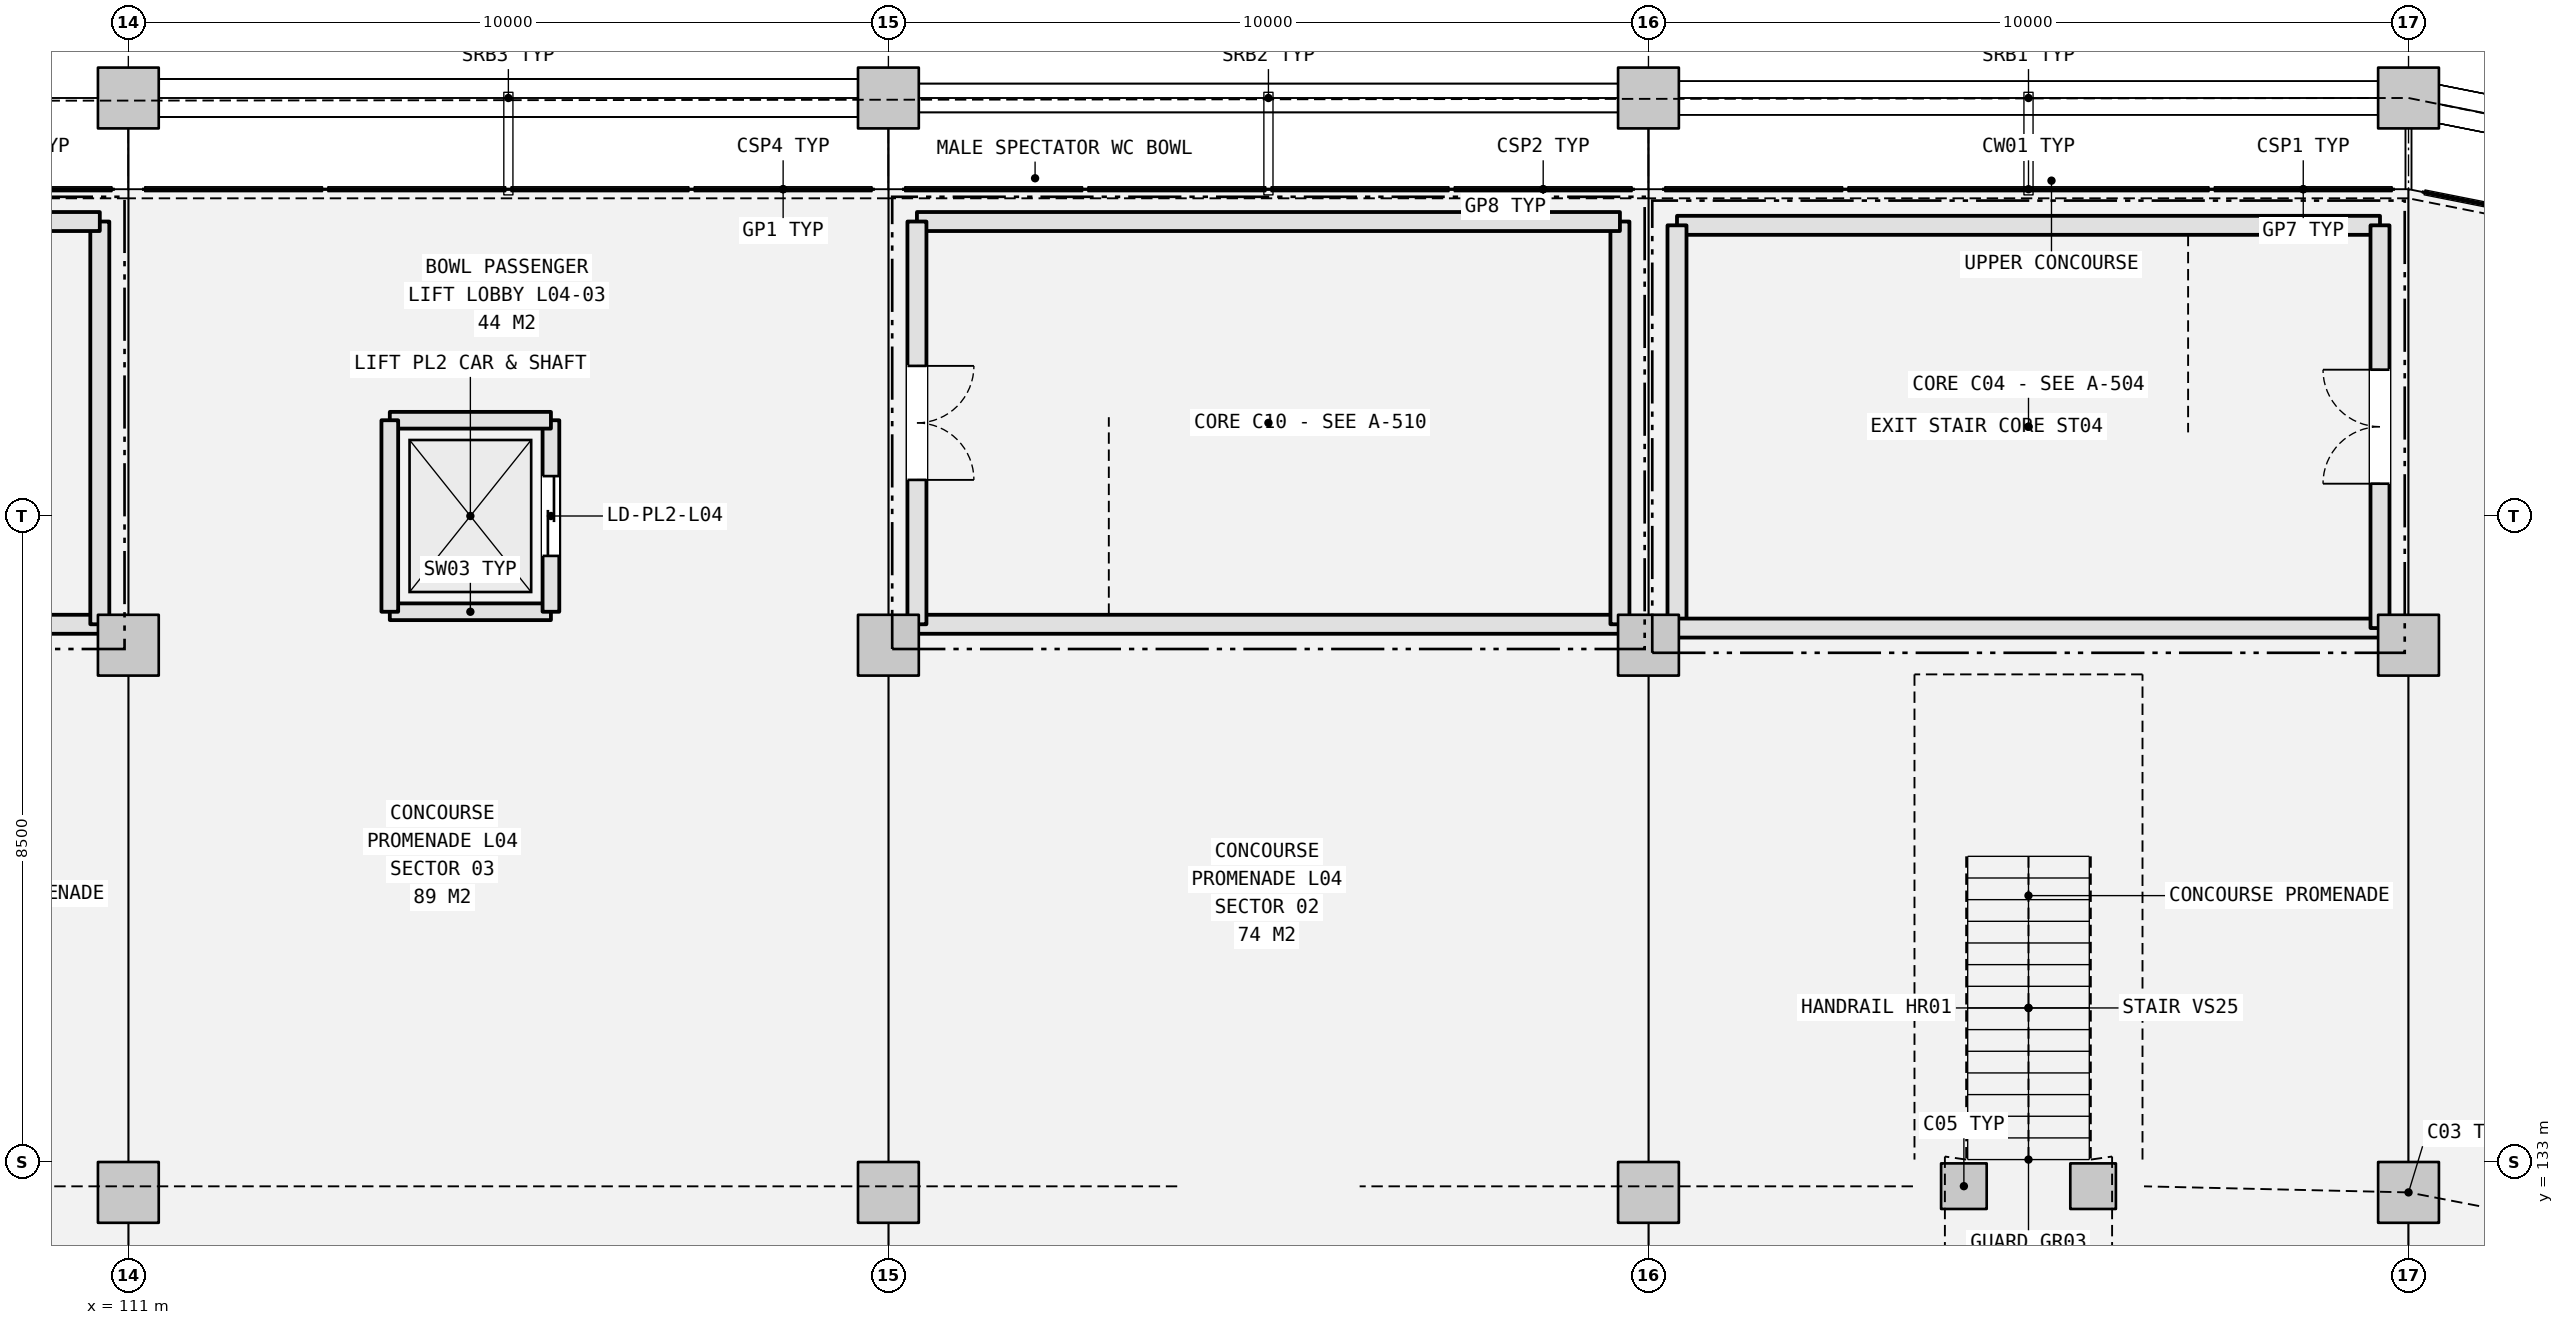
"""IFC4 building model, lengths in metres.
Left out: names, types, materials, properties, quantities, classifications, styles, units other than length and angle.
Written with IfcOpenShell. Run it as: python <this file> out.ifc"""

import sys

from ifc_helpers import new_model, si_unit, direction, frame, frame_2d, origin, origin_2d, place, context, subcontext, project, spatial, rectangle, extrude, element, fill, save


model = new_model("IFC4")
c1 = context("Model", 3, precision=1e-05, world=origin(), true_north=direction((0.0, 1.0)))
c2 = subcontext(c1, "Body", "Model", "MODEL_VIEW")
j1 = project(units=[si_unit("LENGTHUNIT", "METRE"), si_unit("PLANEANGLEUNIT", "RADIAN")], contexts=[c1])
p1 = place(None, origin())
s1 = spatial("IfcSite", under=j1, at=p1, CompositionType="ELEMENT")
p2 = place(p1, origin())
s2 = spatial("IfcBuilding", under=s1, at=p2, CompositionType="ELEMENT")
p3 = place(p2, frame((0.0, 0.0, 21.6)))
s3 = spatial("IfcBuildingStorey", under=s2, at=p3, CompositionType="ELEMENT", Elevation=21.6)
for number, where, z_axis, x_axis in (
    (1, (141.0, 132.6, 0.0), (0.0, 0.0, 1.0), (1.0, 0.0, 0.0)),
    (2, (141.0, 139.8, 0.0), (0.0, 0.0, 1.0), (1.0, 0.0, 0.0)),
    (3, (141.0, 147.0, 0.0), (0.0, 0.0, 1.0), (1.0, 0.0, 0.0)),
    (4, (131.0, 132.6, 0.0), (0.0, 0.0, 1.0), (1.0, 0.0, 0.0)),
    (5, (131.0, 139.8, 0.0), (0.0, 0.0, 1.0), (1.0, 0.0, 0.0)),
    (6, (131.0, 147.0, 0.0), (0.0, 0.0, 1.0), (1.0, 0.0, 0.0)),
    (7, (121.0, 132.6, 0.0), (0.0, 0.0, 1.0), (1.0, 0.0, 0.0)),
    (8, (121.0, 139.8, 0.0), (0.0, 0.0, 1.0), (1.0, 0.0, 0.0)),
    (9, (121.0, 147.0, 0.0), (0.0, 0.0, 1.0), (1.0, 0.0, 0.0)),
    (10, (111.0, 132.6, 0.0), (0.0, 0.0, 1.0), (1.0, 0.0, 0.0)),
    (11, (111.0, 139.8, 0.0), (0.0, 0.0, 1.0), (1.0, 0.0, 0.0)),
    (12, (111.0, 147.0, 0.0), (0.0, 0.0, 1.0), (1.0, 0.0, 0.0)),
):
    element("IfcColumn", number, at=place(p3, frame(where, z_axis=z_axis, x_axis=x_axis)), inside=s3, PredefinedType="COLUMN", context=c2, shape_type="SweptSolid", body=[
        extrude(rectangle(XDim=0.8, YDim=0.8, at=origin_2d()), origin(), (0.0, 0.0, 1.0), 5.4),
    ])
p4 = place(p3, frame((140.625, 145.325, 0.0), z_axis=(0.0, 0.0, 1.0), x_axis=(-1.0, 0.0, 0.0)))
e13 = element("IfcWall", 13, at=p4, inside=s3, PredefinedType="SHEAR", context=c2, shape_type="SweptSolid", body=[
    extrude(rectangle(XDim=9.249, YDim=0.25, at=frame_2d((4.625, 0.0))), origin(), (0.0, 0.0, 1.0), 5.15),
])
p5 = place(p3, frame((131.375, 145.325, 0.0), z_axis=(0.0, 0.0, 1.0), x_axis=(0.0, -1.0, 0.0)))
e14 = element("IfcWall", 14, at=p5, inside=s3, PredefinedType="SHEAR", context=c2, shape_type="SweptSolid", body=[
    extrude(rectangle(XDim=5.299, YDim=0.25, at=frame_2d((2.65, 0.0))), origin(), (0.0, 0.0, 1.0), 5.15),
])
p6 = place(p3, frame((131.375, 140.025, 0.0), z_axis=(0.0, 0.0, 1.0), x_axis=(1.0, 0.0, 0.0)))
e15 = element("IfcWall", 15, at=p6, inside=s3, PredefinedType="SHEAR", context=c2, shape_type="SweptSolid", body=[
    extrude(rectangle(XDim=9.249, YDim=0.25, at=frame_2d((4.625, 0.0))), origin(), (0.0, 0.0, 1.0), 5.15),
])
p7 = place(p3, frame((140.625, 140.025, 0.0), z_axis=(0.0, 0.0, 1.0), x_axis=(0.0, 1.0, 0.0)))
e16 = element("IfcWall", 16, at=p7, inside=s3, PredefinedType="SHEAR", context=c2, shape_type="SweptSolid", body=[
    extrude(rectangle(XDim=5.299, YDim=0.25, at=frame_2d((2.65, 0.0))), origin(), (0.0, 0.0, 1.0), 5.15),
])
p8 = place(p7, frame((1.9, 0.0, 0.0)))
e17 = element("IfcOpeningElement", 17, at=p8, cuts=e16, PredefinedType="OPENING", context=c2, shape_type="SweptSolid", body=[
    extrude(rectangle(XDim=1.5, YDim=2.2, at=frame_2d((0.75, 1.1))), frame((0.0, 0.135, 0.0), z_axis=(0.0, -1.0, 0.0), x_axis=(1.0, 0.0, 0.0)), (0.0, 0.0, 1.0), 0.27),
])
p9 = place(p3, frame((121.375, 140.075, 0.0), z_axis=(0.0, 0.0, 1.0), x_axis=(1.0, 0.0, 0.0)))
e18 = element("IfcWall", 18, at=p9, inside=s3, PredefinedType="SHEAR", context=c2, shape_type="SweptSolid", body=[
    extrude(rectangle(XDim=9.249, YDim=0.25, at=frame_2d((4.625, 0.0))), origin(), (0.0, 0.0, 1.0), 5.15),
])
p10 = place(p3, frame((130.625, 140.075, 0.0), z_axis=(0.0, 0.0, 1.0), x_axis=(0.0, 1.0, 0.0)))
e19 = element("IfcWall", 19, at=p10, inside=s3, PredefinedType="SHEAR", context=c2, shape_type="SweptSolid", body=[
    extrude(rectangle(XDim=5.299, YDim=0.25, at=frame_2d((2.649, 0.0))), origin(), (0.0, 0.0, 1.0), 5.15),
])
p11 = place(p3, frame((130.625, 145.375, 0.0), z_axis=(0.0, 0.0, 1.0), x_axis=(-1.0, 0.0, 0.0)))
e20 = element("IfcWall", 20, at=p11, inside=s3, PredefinedType="SHEAR", context=c2, shape_type="SweptSolid", body=[
    extrude(rectangle(XDim=9.249, YDim=0.25, at=frame_2d((4.625, 0.0))), origin(), (0.0, 0.0, 1.0), 5.15),
])
p12 = place(p3, frame((121.375, 145.375, 0.0), z_axis=(0.0, 0.0, 1.0), x_axis=(0.0, -1.0, 0.0)))
e21 = element("IfcWall", 21, at=p12, inside=s3, PredefinedType="SHEAR", context=c2, shape_type="SweptSolid", body=[
    extrude(rectangle(XDim=5.299, YDim=0.25, at=frame_2d((2.649, 0.0))), origin(), (0.0, 0.0, 1.0), 5.15),
])
p13 = place(p12, frame((1.9, 0.0, 0.0)))
e22 = element("IfcOpeningElement", 22, at=p13, cuts=e21, PredefinedType="OPENING", context=c2, shape_type="SweptSolid", body=[
    extrude(rectangle(XDim=1.5, YDim=2.2, at=frame_2d((0.75, 1.1))), frame((0.0, 0.135, 0.0), z_axis=(0.0, -1.0, 0.0), x_axis=(1.0, 0.0, 0.0)), (0.0, 0.0, 1.0), 0.27),
])
p14 = place(p3, frame((101.375, 140.075, 0.0), z_axis=(0.0, 0.0, 1.0), x_axis=(1.0, 0.0, 0.0)))
e23 = element("IfcWall", 23, at=p14, inside=s3, PredefinedType="SHEAR", context=c2, shape_type="SweptSolid", body=[
    extrude(rectangle(XDim=9.249, YDim=0.25, at=frame_2d((4.625, 0.0))), origin(), (0.0, 0.0, 1.0), 5.15),
])
p15 = place(p3, frame((110.625, 140.075, 0.0), z_axis=(0.0, 0.0, 1.0), x_axis=(0.0, 1.0, 0.0)))
e24 = element("IfcWall", 24, at=p15, inside=s3, PredefinedType="SHEAR", context=c2, shape_type="SweptSolid", body=[
    extrude(rectangle(XDim=5.299, YDim=0.25, at=frame_2d((2.649, 0.0))), origin(), (0.0, 0.0, 1.0), 5.15),
])
p16 = place(p3, frame((110.625, 145.375, 0.0), z_axis=(0.0, 0.0, 1.0), x_axis=(-1.0, 0.0, 0.0)))
e25 = element("IfcWall", 25, at=p16, inside=s3, PredefinedType="SHEAR", context=c2, shape_type="SweptSolid", body=[
    extrude(rectangle(XDim=9.249, YDim=0.25, at=frame_2d((4.625, 0.0))), origin(), (0.0, 0.0, 1.0), 5.15),
])
for number, where, z_axis, x_axis in (
    (26, (135.15, 132.682, 0.0), (0.0, 0.0, 1.0), (1.0, 0.0, 0.0)),
    (27, (136.85, 132.682, 0.0), (0.0, 0.0, 1.0), (1.0, 0.0, 0.0)),
):
    element("IfcColumn", number, at=place(p3, frame(where, z_axis=z_axis, x_axis=x_axis)), inside=s3, PredefinedType="COLUMN", context=c2, shape_type="SweptSolid", body=[
        extrude(rectangle(XDim=0.6, YDim=0.6, at=origin_2d()), origin(), (0.0, 0.0, 1.0), 2.494),
    ])
p17 = place(p3, frame((114.44, 140.24, 0.0), z_axis=(0.0, 0.0, 1.0), x_axis=(1.0, 0.0, 0.0)))
e28 = element("IfcWall", 28, at=p17, inside=s3, PredefinedType="SHEAR", context=c2, shape_type="SweptSolid", body=[
    extrude(rectangle(XDim=2.12, YDim=0.22, at=frame_2d((1.06, 0.0))), origin(), (0.0, 0.0, 1.0), 5.15),
])
p18 = place(p3, frame((116.56, 140.24, 0.0), z_axis=(0.0, 0.0, 1.0), x_axis=(0.0, 1.0, 0.0)))
e29 = element("IfcWall", 29, at=p18, inside=s3, PredefinedType="SHEAR", context=c2, shape_type="SweptSolid", body=[
    extrude(rectangle(XDim=2.52, YDim=0.22, at=frame_2d((1.26, 0.0))), origin(), (0.0, 0.0, 1.0), 5.15),
])
p19 = place(p18, frame((0.735, 0.0, 0.0)))
e30 = element("IfcOpeningElement", 30, at=p19, cuts=e29, PredefinedType="OPENING", context=c2, shape_type="SweptSolid", body=[
    extrude(rectangle(XDim=1.05, YDim=2.15, at=frame_2d((0.525, 1.075))), frame((0.0, 0.12, 0.0), z_axis=(0.0, -1.0, 0.0), x_axis=(1.0, 0.0, 0.0)), (0.0, 0.0, 1.0), 0.24),
])
p20 = place(p3, frame((116.56, 142.76, 0.0), z_axis=(0.0, 0.0, 1.0), x_axis=(-1.0, 0.0, 0.0)))
e31 = element("IfcWall", 31, at=p20, inside=s3, PredefinedType="SHEAR", context=c2, shape_type="SweptSolid", body=[
    extrude(rectangle(XDim=2.12, YDim=0.22, at=frame_2d((1.06, 0.0))), origin(), (0.0, 0.0, 1.0), 5.15),
])
p21 = place(p3, frame((114.44, 142.76, 0.0), z_axis=(0.0, 0.0, 1.0), x_axis=(0.0, -1.0, 0.0)))
e32 = element("IfcWall", 32, at=p21, inside=s3, PredefinedType="SHEAR", context=c2, shape_type="SweptSolid", body=[
    extrude(rectangle(XDim=2.52, YDim=0.22, at=frame_2d((1.26, 0.0))), origin(), (0.0, 0.0, 1.0), 5.15),
])
p22 = place(p8, origin())
e33 = element("IfcDoor", 33, at=p22, inside=s3, OperationType="DOUBLE_DOOR_SINGLE_SWING", PredefinedType="DOOR", context=c2, shape_type="SweptSolid", body=[
    extrude(rectangle(XDim=1.5, YDim=2.2, at=frame_2d((0.75, 1.1))), frame((0.0, 0.025, 0.0), z_axis=(0.0, -1.0, 0.0), x_axis=(1.0, 0.0, 0.0)), (0.0, 0.0, 1.0), 0.05),
])
fill(e17, e33)
p23 = place(p13, origin())
e34 = element("IfcDoor", 34, at=p23, inside=s3, OperationType="DOUBLE_DOOR_SINGLE_SWING", PredefinedType="DOOR", context=c2, shape_type="SweptSolid", body=[
    extrude(rectangle(XDim=1.5, YDim=2.2, at=frame_2d((0.75, 1.1))), frame((0.0, 0.025, 0.0), z_axis=(0.0, -1.0, 0.0), x_axis=(1.0, 0.0, 0.0)), (0.0, 0.0, 1.0), 0.05),
])
fill(e22, e34)
p24 = place(p19, origin())
e35 = element("IfcDoor", 35, at=p24, inside=s3, OperationType="DOUBLE_DOOR_SLIDING", PredefinedType="DOOR", context=c2, shape_type="SweptSolid", body=[
    extrude(rectangle(XDim=1.05, YDim=2.15, at=frame_2d((0.525, 1.075))), frame((0.0, 0.025, 0.0), z_axis=(0.0, -1.0, 0.0), x_axis=(1.0, 0.0, 0.0)), (0.0, 0.0, 1.0), 0.05),
])
fill(e30, e35)
save(model, sys.argv[1])
